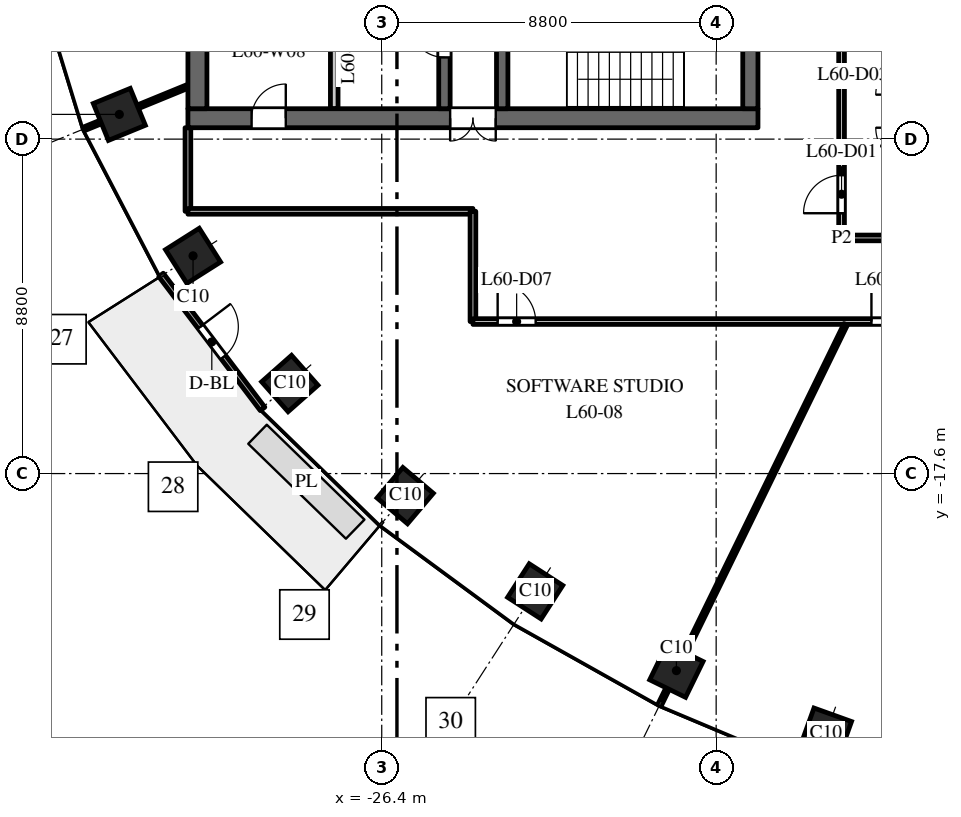
"""IFC4 building model, lengths in metres.
Left out: names, types, materials, properties, quantities, classifications, styles, units other than length and angle.
Written with IfcOpenShell. Run it as: python <this file> out.ifc"""

import sys

from ifc_helpers import new_model, si_unit, direction, frame, frame_2d, origin, origin_2d, place, context, subcontext, project, spatial, rectangle, extrude, element, fill, save


model = new_model("IFC4")
c1 = context("Model", 3, precision=1e-05, world=origin(), true_north=direction((0.0, 1.0)))
c2 = subcontext(c1, "Body", "Model", "MODEL_VIEW")
j1 = project(units=[si_unit("LENGTHUNIT", "METRE"), si_unit("PLANEANGLEUNIT", "RADIAN")], contexts=[c1])
p1 = place(None, origin())
s1 = spatial("IfcSite", under=j1, at=p1, CompositionType="ELEMENT")
p2 = place(p1, origin())
s2 = spatial("IfcBuilding", under=s1, at=p2, CompositionType="ELEMENT")
p3 = place(p2, frame((0.0, 0.0, 281.5)))
s3 = spatial("IfcBuildingStorey", under=s2, at=p3, CompositionType="ELEMENT", Elevation=281.5)
for number, where, z_axis, x_axis in (
    (1, (-33.305, -8.149, 0.0), (0.0, 0.0, 1.0), (0.379, -0.925, 0.0)),
    (2, (-31.365, -11.871, 0.0), (0.0, 0.0, 1.0), (0.535, -0.845, 0.0)),
    (3, (-28.819, -15.23, 0.0), (0.0, 0.0, 1.0), (0.663, -0.749, 0.0)),
    (4, (-25.783, -18.18, 0.0), (0.0, 0.0, 1.0), (0.763, -0.646, 0.0)),
    (5, (-22.362, -20.7, 0.0), (0.0, 0.0, 1.0), (0.84, -0.542, 0.0)),
    (6, (-18.646, -22.785, 0.0), (0.0, 0.0, 1.0), (0.898, -0.439, 0.0)),
    (7, (-14.709, -24.441, 0.0), (0.0, 0.0, 1.0), (0.941, -0.338, 0.0)),
):
    element("IfcColumn", number, at=place(p3, frame(where, z_axis=z_axis, x_axis=x_axis)), inside=s3, PredefinedType="COLUMN", context=c2, shape_type="SweptSolid", body=[
        extrude(rectangle(XDim=1.05, YDim=1.05, at=origin_2d()), origin(), (0.0, 0.0, 1.0), 4.0),
    ])
p4 = place(p3, frame((-16.5, -8.25, 0.0), z_axis=(0.0, 0.0, 1.0), x_axis=(-1.0, 0.0, 0.0)))
e8 = element("IfcWall", 8, at=p4, inside=s3, PredefinedType="SHEAR", context=c2, shape_type="SweptSolid", body=[
    extrude(rectangle(XDim=15.0, YDim=0.5, at=frame_2d((7.5, 0.0))), origin(), (0.0, 0.0, 1.0), 3.7),
])
p5 = place(p4, frame((6.9, 0.0, 0.0)))
e9 = element("IfcOpeningElement", 9, at=p5, cuts=e8, PredefinedType="OPENING", context=c2, shape_type="SweptSolid", body=[
    extrude(rectangle(XDim=1.2, YDim=2.1, at=frame_2d((0.6, 1.05))), frame((0.0, 0.26, 0.0), z_axis=(0.0, -1.0, 0.0), x_axis=(1.0, 0.0, 0.0)), (0.0, 0.0, 1.0), 0.52),
])
p6 = place(p4, frame((12.425, 0.0, 0.0)))
e10 = element("IfcOpeningElement", 10, at=p6, cuts=e8, PredefinedType="OPENING", context=c2, shape_type="SweptSolid", body=[
    extrude(rectangle(XDim=0.9, YDim=2.1, at=frame_2d((0.45, 1.05))), frame((0.0, 0.26, 0.0), z_axis=(0.0, -1.0, 0.0), x_axis=(1.0, 0.0, 0.0)), (0.0, 0.0, 1.0), 0.52),
])
p7 = place(p3, frame((-24.75, -8.0, 0.0), z_axis=(0.0, 0.0, 1.0), x_axis=(0.0, 1.0, 0.0)))
e11 = element("IfcWall", 11, at=p7, inside=s3, PredefinedType="SHEAR", context=c2, shape_type="SweptSolid", body=[
    extrude(rectangle(XDim=16.0, YDim=0.3, at=frame_2d((8.0, 0.0))), origin(), (0.0, 0.0, 1.0), 3.7),
])
p8 = place(p7, frame((4.425, 0.0, 0.0)))
e12 = element("IfcOpeningElement", 12, at=p8, cuts=e11, PredefinedType="OPENING", context=c2, shape_type="SweptSolid", body=[
    extrude(rectangle(XDim=1.1, YDim=2.1, at=frame_2d((0.55, 1.05))), frame((0.0, 0.16, 0.0), z_axis=(0.0, -1.0, 0.0), x_axis=(1.0, 0.0, 0.0)), (0.0, 0.0, 1.0), 0.32),
])
p9 = place(p7, frame((7.45, 0.0, 0.0)))
e13 = element("IfcOpeningElement", 13, at=p9, cuts=e11, PredefinedType="OPENING", context=c2, shape_type="SweptSolid", body=[
    extrude(rectangle(XDim=1.1, YDim=2.1, at=frame_2d((0.55, 1.05))), frame((0.0, 0.16, 0.0), z_axis=(0.0, -1.0, 0.0), x_axis=(1.0, 0.0, 0.0)), (0.0, 0.0, 1.0), 0.32),
])
p10 = place(p7, frame((10.475, 0.0, 0.0)))
e14 = element("IfcOpeningElement", 14, at=p10, cuts=e11, PredefinedType="OPENING", context=c2, shape_type="SweptSolid", body=[
    extrude(rectangle(XDim=1.1, YDim=2.1, at=frame_2d((0.55, 1.05))), frame((0.0, 0.16, 0.0), z_axis=(0.0, -1.0, 0.0), x_axis=(1.0, 0.0, 0.0)), (0.0, 0.0, 1.0), 0.32),
])
p11 = place(p7, frame((13.125, 0.0, 0.0)))
e15 = element("IfcOpeningElement", 15, at=p11, cuts=e11, PredefinedType="OPENING", context=c2, shape_type="SweptSolid", body=[
    extrude(rectangle(XDim=0.9, YDim=2.1, at=frame_2d((0.45, 1.05))), frame((0.0, 0.16, 0.0), z_axis=(0.0, -1.0, 0.0), x_axis=(1.0, 0.0, 0.0)), (0.0, 0.0, 1.0), 0.32),
])
p12 = place(p7, frame((14.75, 0.0, 0.0)))
e16 = element("IfcOpeningElement", 16, at=p12, cuts=e11, PredefinedType="OPENING", context=c2, shape_type="SweptSolid", body=[
    extrude(rectangle(XDim=0.9, YDim=2.1, at=frame_2d((0.45, 1.05))), frame((0.0, 0.16, 0.0), z_axis=(0.0, -1.0, 0.0), x_axis=(1.0, 0.0, 0.0)), (0.0, 0.0, 1.0), 0.32),
])
p13 = place(p7, frame((1.35, 0.0, 0.0)))
e17 = element("IfcOpeningElement", 17, at=p13, cuts=e11, PredefinedType="OPENING", context=c2, shape_type="SweptSolid", body=[
    extrude(rectangle(XDim=0.9, YDim=2.1, at=frame_2d((0.45, 1.05))), frame((0.0, 0.16, 0.0), z_axis=(0.0, -1.0, 0.0), x_axis=(1.0, 0.0, 0.0)), (0.0, 0.0, 1.0), 0.32),
])
p14 = place(p3, frame((-16.7, -8.0, 0.0), z_axis=(0.0, 0.0, 1.0), x_axis=(0.0, 1.0, 0.0)))
e18 = element("IfcWall", 18, at=p14, inside=s3, PredefinedType="SHEAR", context=c2, shape_type="SweptSolid", body=[
    extrude(rectangle(XDim=16.0, YDim=0.4, at=frame_2d((8.0, 0.0))), origin(), (0.0, 0.0, 1.0), 3.7),
])
p15 = place(p3, frame((-31.25, -8.0, 0.0), z_axis=(0.0, 0.0, 1.0), x_axis=(0.0, 1.0, 0.0)))
e19 = element("IfcWall", 19, at=p15, inside=s3, PredefinedType="SHEAR", context=c2, shape_type="SweptSolid", body=[
    extrude(rectangle(XDim=16.0, YDim=0.5, at=frame_2d((8.0, 0.0))), origin(), (0.0, 0.0, 1.0), 3.7),
])
p16 = place(p3, frame((-27.65, -8.0, 0.0), z_axis=(0.0, 0.0, 1.0), x_axis=(0.0, 1.0, 0.0)))
e20 = element("IfcWall", 20, at=p16, inside=s3, PredefinedType="PARTITIONING", context=c2, shape_type="SweptSolid", body=[
    extrude(rectangle(XDim=3.25, YDim=0.2, at=frame_2d((1.625, 0.0))), origin(), (0.0, 0.0, 1.0), 3.7),
])
p17 = place(p3, frame((-23.23, -8.0, 0.0), z_axis=(0.0, 0.0, 1.0), x_axis=(0.0, 1.0, 0.0)))
e21 = element("IfcWall", 21, at=p17, inside=s3, PredefinedType="SHEAR", context=c2, shape_type="SweptSolid", body=[
    extrude(rectangle(XDim=7.875, YDim=0.3, at=frame_2d((3.938, 0.0))), origin(), (0.0, 0.0, 1.0), 3.7),
])
p18 = place(p17, frame((5.15, 0.0, 0.0)))
e22 = element("IfcOpeningElement", 22, at=p18, cuts=e21, PredefinedType="OPENING", context=c2, shape_type="SweptSolid", body=[
    extrude(rectangle(XDim=1.1, YDim=2.1, at=frame_2d((0.55, 1.05))), frame((0.0, 0.16, 0.0), z_axis=(0.0, -1.0, 0.0), x_axis=(1.0, 0.0, 0.0)), (0.0, 0.0, 1.0), 0.32),
])
p19 = place(p3, frame((-32.208, -12.374, 0.0), z_axis=(0.0, 0.0, 1.0), x_axis=(0.604045763106, -0.796949632081, 0.0)))
e23 = element("IfcWall", 23, at=p19, inside=s3, PredefinedType="STANDARD", context=c2, shape_type="SweptSolid", body=[
    extrude(rectangle(XDim=4.423, YDim=0.15, at=frame_2d((2.212, 0.0))), origin(), (0.0, 0.0, 1.0), 3.7),
])
p20 = place(p19, frame((1.712, 0.0, 0.0)))
e24 = element("IfcOpeningElement", 24, at=p20, cuts=e23, PredefinedType="OPENING", context=c2, shape_type="SweptSolid", body=[
    extrude(rectangle(XDim=1.0, YDim=2.4, at=frame_2d((0.5, 1.2))), frame((0.0, 0.085, 0.0), z_axis=(0.0, -1.0, 0.0), x_axis=(1.0, 0.0, 0.0)), (0.0, 0.0, 1.0), 0.17),
])
p21 = place(p3, frame((-34.234, -8.53, 0.0), z_axis=(0.0, 0.0, 1.0), x_axis=(0.925344112436, 0.379128307542, 0.0)))
e25 = element("IfcWall", 25, at=p21, inside=s3, PredefinedType="PARTITIONING", context=c2, shape_type="SweptSolid", body=[
    extrude(rectangle(XDim=2.954, YDim=0.1, at=frame_2d((1.477, 0.0))), origin(), (0.0, 0.0, 1.0), 3.0),
])
p22 = place(p3, frame((-31.5, -10.7, 0.0), z_axis=(0.0, 0.0, 1.0), x_axis=(0.0, 1.0, 0.0)))
e26 = element("IfcWall", 26, at=p22, inside=s3, PredefinedType="PARTITIONING", context=c2, shape_type="SweptSolid", body=[
    extrude(rectangle(XDim=2.2, YDim=0.15, at=frame_2d((1.1, 0.0))), origin(), (0.0, 0.0, 1.0), 3.7),
])
p23 = place(p3, frame((-31.5, -10.7, 0.0), z_axis=(0.0, 0.0, 1.0), x_axis=(1.0, 0.0, 0.0)))
e27 = element("IfcWall", 27, at=p23, inside=s3, PredefinedType="PARTITIONING", context=c2, shape_type="SweptSolid", body=[
    extrude(rectangle(XDim=7.5, YDim=0.15, at=frame_2d((3.75, 0.0))), origin(), (0.0, 0.0, 1.0), 3.1),
])
p24 = place(p3, frame((-24.0, -13.6, 0.0), z_axis=(0.0, 0.0, 1.0), x_axis=(0.0, 1.0, 0.0)))
e28 = element("IfcWall", 28, at=p24, inside=s3, PredefinedType="PARTITIONING", context=c2, shape_type="SweptSolid", body=[
    extrude(rectangle(XDim=2.9, YDim=0.15, at=frame_2d((1.45, 0.0))), origin(), (0.0, 0.0, 1.0), 3.7),
])
p25 = place(p3, frame((-24.0, -13.6, 0.0), z_axis=(0.0, 0.0, 1.0), x_axis=(1.0, 0.0, 0.0)))
e29 = element("IfcWall", 29, at=p25, inside=s3, PredefinedType="PARTITIONING", context=c2, shape_type="SweptSolid", body=[
    extrude(rectangle(XDim=23.05, YDim=0.15, at=frame_2d((11.525, 0.0))), origin(), (0.0, 0.0, 1.0), 2.75),
])
p26 = place(p25, frame((0.65, 0.0, 0.0)))
e30 = element("IfcOpeningElement", 30, at=p26, cuts=e29, PredefinedType="OPENING", context=c2, shape_type="SweptSolid", body=[
    extrude(rectangle(XDim=1.0, YDim=2.1, at=frame_2d((0.5, 1.05))), frame((0.0, 0.085, 0.0), z_axis=(0.0, -1.0, 0.0), x_axis=(1.0, 0.0, 0.0)), (0.0, 0.0, 1.0), 0.17),
])
p27 = place(p25, frame((10.486, 0.0, 0.0)))
e31 = element("IfcOpeningElement", 31, at=p27, cuts=e29, PredefinedType="OPENING", context=c2, shape_type="SweptSolid", body=[
    extrude(rectangle(XDim=1.0, YDim=2.1, at=frame_2d((0.5, 1.05))), frame((0.0, 0.085, 0.0), z_axis=(0.0, -1.0, 0.0), x_axis=(1.0, 0.0, 0.0)), (0.0, 0.0, 1.0), 0.17),
])
p28 = place(p3, frame((-19.086, -23.685, 0.0), z_axis=(0.0, 0.0, 1.0), x_axis=(0.439228995151, 0.898375138691, 0.0)))
e32 = element("IfcWall", 32, at=p28, inside=s3, PredefinedType="PARTITIONING", context=c2, shape_type="SweptSolid", body=[
    extrude(rectangle(XDim=11.142, YDim=0.1, at=frame_2d((5.571, 0.0))), origin(), (0.0, 0.0, 1.0), 2.85),
])
p29 = place(p3, frame((-14.3, -11.4, 0.0), z_axis=(0.0, 0.0, 1.0), x_axis=(0.0, 1.0, 0.0)))
e33 = element("IfcWall", 33, at=p29, inside=s3, PredefinedType="PARTITIONING", context=c2, shape_type="SweptSolid", body=[
    extrude(rectangle(XDim=22.8, YDim=0.15, at=frame_2d((11.4, 0.0))), origin(), (0.0, 0.0, 1.0), 2.75),
])
p30 = place(p29, frame((0.65, 0.0, 0.0)))
e34 = element("IfcOpeningElement", 34, at=p30, cuts=e33, PredefinedType="OPENING", context=c2, shape_type="SweptSolid", body=[
    extrude(rectangle(XDim=1.0, YDim=2.1, at=frame_2d((0.5, 1.05))), frame((0.0, 0.085, 0.0), z_axis=(0.0, -1.0, 0.0), x_axis=(1.0, 0.0, 0.0)), (0.0, 0.0, 1.0), 0.17),
])
p31 = place(p3, frame((-14.3, -11.4, 0.0), z_axis=(0.0, 0.0, 1.0), x_axis=(1.0, 0.0, 0.0)))
e35 = element("IfcWall", 35, at=p31, inside=s3, PredefinedType="PARTITIONING", context=c2, shape_type="SweptSolid", body=[
    extrude(rectangle(XDim=28.6, YDim=0.15, at=frame_2d((14.3, 0.0))), origin(), (0.0, 0.0, 1.0), 2.85),
])
p32 = place(p31, frame((10.627, 0.0, 0.0)))
e36 = element("IfcOpeningElement", 36, at=p32, cuts=e35, PredefinedType="OPENING", context=c2, shape_type="SweptSolid", body=[
    extrude(rectangle(XDim=1.0, YDim=2.1, at=frame_2d((0.5, 1.05))), frame((0.0, 0.085, 0.0), z_axis=(0.0, -1.0, 0.0), x_axis=(1.0, 0.0, 0.0)), (0.0, 0.0, 1.0), 0.17),
])
p33 = place(p31, frame((15.393, 0.0, 0.0)))
e37 = element("IfcOpeningElement", 37, at=p33, cuts=e35, PredefinedType="OPENING", context=c2, shape_type="SweptSolid", body=[
    extrude(rectangle(XDim=1.0, YDim=2.1, at=frame_2d((0.5, 1.05))), frame((0.0, 0.085, 0.0), z_axis=(0.0, -1.0, 0.0), x_axis=(1.0, 0.0, 0.0)), (0.0, 0.0, 1.0), 0.17),
])
p34 = place(p5, origin())
e38 = element("IfcDoor", 38, at=p34, inside=s3, OperationType="DOUBLE_DOOR_DOUBLE_SWING", PredefinedType="DOOR", context=c2, shape_type="SweptSolid", body=[
    extrude(rectangle(XDim=1.2, YDim=2.1, at=frame_2d((0.6, 1.05))), frame((0.0, 0.025, 0.0), z_axis=(0.0, -1.0, 0.0), x_axis=(1.0, 0.0, 0.0)), (0.0, 0.0, 1.0), 0.05),
])
fill(e9, e38)
p35 = place(p13, origin())
e39 = element("IfcDoor", 39, at=p35, inside=s3, OperationType="SINGLE_SWING_LEFT", PredefinedType="DOOR", context=c2, shape_type="SweptSolid", body=[
    extrude(rectangle(XDim=0.9, YDim=2.1, at=frame_2d((0.45, 1.05))), frame((0.0, 0.025, 0.0), z_axis=(0.0, -1.0, 0.0), x_axis=(1.0, 0.0, 0.0)), (0.0, 0.0, 1.0), 0.05),
])
fill(e17, e39)
p36 = place(p6, origin())
e40 = element("IfcDoor", 40, at=p36, inside=s3, OperationType="SINGLE_SWING_LEFT", PredefinedType="DOOR", context=c2, shape_type="SweptSolid", body=[
    extrude(rectangle(XDim=0.9, YDim=2.1, at=frame_2d((0.45, 1.05))), frame((0.0, 0.025, 0.0), z_axis=(0.0, -1.0, 0.0), x_axis=(1.0, 0.0, 0.0)), (0.0, 0.0, 1.0), 0.05),
])
fill(e10, e40)
p37 = place(p20, origin())
e41 = element("IfcDoor", 41, at=p37, inside=s3, OperationType="SINGLE_SWING_LEFT", PredefinedType="DOOR", context=c2, shape_type="SweptSolid", body=[
    extrude(rectangle(XDim=1.0, YDim=2.4, at=frame_2d((0.5, 1.2))), frame((0.0, 0.025, 0.0), z_axis=(0.0, -1.0, 0.0), x_axis=(1.0, 0.0, 0.0)), (0.0, 0.0, 1.0), 0.05),
])
fill(e24, e41)
p38 = place(p30, origin())
e42 = element("IfcDoor", 42, at=p38, inside=s3, OperationType="SINGLE_SWING_LEFT", PredefinedType="DOOR", context=c2, shape_type="SweptSolid", body=[
    extrude(rectangle(XDim=1.0, YDim=2.1, at=frame_2d((0.5, 1.05))), frame((0.0, 0.025, 0.0), z_axis=(0.0, -1.0, 0.0), x_axis=(1.0, 0.0, 0.0)), (0.0, 0.0, 1.0), 0.05),
])
fill(e34, e42)
p39 = place(p26, origin())
e43 = element("IfcDoor", 43, at=p39, inside=s3, OperationType="SINGLE_SWING_LEFT", PredefinedType="DOOR", context=c2, shape_type="SweptSolid", body=[
    extrude(rectangle(XDim=1.0, YDim=2.1, at=frame_2d((0.5, 1.05))), frame((0.0, 0.025, 0.0), z_axis=(0.0, -1.0, 0.0), x_axis=(1.0, 0.0, 0.0)), (0.0, 0.0, 1.0), 0.05),
])
fill(e30, e43)
p40 = place(p27, origin())
e44 = element("IfcDoor", 44, at=p40, inside=s3, OperationType="SINGLE_SWING_LEFT", PredefinedType="DOOR", context=c2, shape_type="SweptSolid", body=[
    extrude(rectangle(XDim=1.0, YDim=2.1, at=frame_2d((0.5, 1.05))), frame((0.0, 0.025, 0.0), z_axis=(0.0, -1.0, 0.0), x_axis=(1.0, 0.0, 0.0)), (0.0, 0.0, 1.0), 0.05),
])
fill(e31, e44)
save(model, sys.argv[1])
